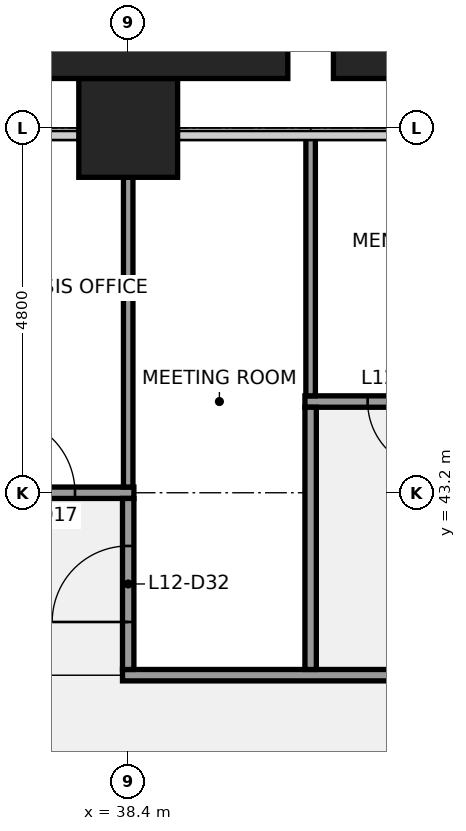
"""IFC4 building model, lengths in metres.
Left out: names, types, materials, properties, quantities, classifications, styles, units other than length and angle.
Written with IfcOpenShell. Run it as: python <this file> out.ifc"""

import sys

from ifc_helpers import new_model, si_unit, direction, frame, frame_2d, origin, origin_2d, place, context, subcontext, project, spatial, rectangle, extrude, element, fill, save


model = new_model("IFC4")
c1 = context("Model", 3, precision=1e-05, world=origin(), true_north=direction((0.0, 1.0)))
c2 = subcontext(c1, "Body", "Model", "MODEL_VIEW")
j1 = project(units=[si_unit("LENGTHUNIT", "METRE"), si_unit("PLANEANGLEUNIT", "RADIAN")], contexts=[c1])
p1 = place(None, origin())
s1 = spatial("IfcSite", under=j1, at=p1, CompositionType="ELEMENT")
p2 = place(p1, origin())
s2 = spatial("IfcBuilding", under=s1, at=p2, CompositionType="ELEMENT")
p3 = place(p2, frame((0.0, 0.0, 59.0)))
s3 = spatial("IfcBuildingStorey", under=s2, at=p3, CompositionType="ELEMENT", Elevation=59.0)
p4 = place(p3, frame((38.4, 48.0, 0.0), z_axis=(0.0, 0.0, 1.0), x_axis=(1.0, 0.0, 0.0)))
e1 = element("IfcColumn", 1, at=p4, inside=s3, PredefinedType="COLUMN", context=c2, shape_type="SweptSolid", body=[
    extrude(rectangle(XDim=1.3, YDim=1.3, at=origin_2d()), origin(), (0.0, 0.0, 1.0), 4.0),
])
p5 = place(p3, frame((38.325, 40.8, 0.0), z_axis=(0.0, 0.0, 1.0), x_axis=(1.0, 0.0, 0.0)))
e2 = element("IfcWall", 2, at=p5, inside=s3, PredefinedType="PARTITIONING", context=c2, shape_type="SweptSolid", body=[
    extrude(rectangle(XDim=9.75, YDim=0.15, at=frame_2d((4.875, 0.0))), origin(), (0.0, 0.0, 1.0), 2.87),
])
p6 = place(p5, frame((5.575, 0.0, 0.0)))
e3 = element("IfcOpeningElement", 3, at=p6, cuts=e2, PredefinedType="OPENING", context=c2, shape_type="SweptSolid", body=[
    extrude(rectangle(XDim=1.0, YDim=2.1, at=frame_2d((0.5, 1.05))), frame((0.0, 0.085, 0.0), z_axis=(0.0, -1.0, 0.0), x_axis=(1.0, 0.0, 0.0)), (0.0, 0.0, 1.0), 0.17),
])
p7 = place(p3, frame((19.125, 43.2, 0.0), z_axis=(0.0, 0.0, 1.0), x_axis=(1.0, 0.0, 0.0)))
e4 = element("IfcWall", 4, at=p7, inside=s3, PredefinedType="PARTITIONING", context=c2, shape_type="SweptSolid", body=[
    extrude(rectangle(XDim=19.35, YDim=0.15, at=frame_2d((9.675, 0.0))), origin(), (0.0, 0.0, 1.0), 2.87),
])
p8 = place(p7, frame((4.375, 0.0, 0.0)))
e5 = element("IfcOpeningElement", 5, at=p8, cuts=e4, PredefinedType="OPENING", context=c2, shape_type="SweptSolid", body=[
    extrude(rectangle(XDim=1.0, YDim=2.1, at=frame_2d((0.5, 1.05))), frame((0.0, 0.085, 0.0), z_axis=(0.0, -1.0, 0.0), x_axis=(1.0, 0.0, 0.0)), (0.0, 0.0, 1.0), 0.17),
])
p9 = place(p7, frame((10.375, 0.0, 0.0)))
e6 = element("IfcOpeningElement", 6, at=p9, cuts=e4, PredefinedType="OPENING", context=c2, shape_type="SweptSolid", body=[
    extrude(rectangle(XDim=1.0, YDim=2.1, at=frame_2d((0.5, 1.05))), frame((0.0, 0.085, 0.0), z_axis=(0.0, -1.0, 0.0), x_axis=(1.0, 0.0, 0.0)), (0.0, 0.0, 1.0), 0.17),
])
p10 = place(p7, frame((13.975, 0.0, 0.0)))
e7 = element("IfcOpeningElement", 7, at=p10, cuts=e4, PredefinedType="OPENING", context=c2, shape_type="SweptSolid", body=[
    extrude(rectangle(XDim=1.0, YDim=2.1, at=frame_2d((0.5, 1.05))), frame((0.0, 0.085, 0.0), z_axis=(0.0, -1.0, 0.0), x_axis=(1.0, 0.0, 0.0)), (0.0, 0.0, 1.0), 0.17),
])
p11 = place(p7, frame((17.575, 0.0, 0.0)))
e8 = element("IfcOpeningElement", 8, at=p11, cuts=e4, PredefinedType="OPENING", context=c2, shape_type="SweptSolid", body=[
    extrude(rectangle(XDim=1.0, YDim=2.1, at=frame_2d((0.5, 1.05))), frame((0.0, 0.085, 0.0), z_axis=(0.0, -1.0, 0.0), x_axis=(1.0, 0.0, 0.0)), (0.0, 0.0, 1.0), 0.17),
])
p12 = place(p3, frame((40.725, 44.4, 0.0), z_axis=(0.0, 0.0, 1.0), x_axis=(1.0, 0.0, 0.0)))
e9 = element("IfcWall", 9, at=p12, inside=s3, PredefinedType="PARTITIONING", context=c2, shape_type="SweptSolid", body=[
    extrude(rectangle(XDim=7.175, YDim=0.15, at=frame_2d((3.587, 0.0))), origin(), (0.0, 0.0, 1.0), 2.87),
])
p13 = place(p12, frame((0.825, 0.0, 0.0)))
e10 = element("IfcOpeningElement", 10, at=p13, cuts=e9, PredefinedType="OPENING", context=c2, shape_type="SweptSolid", body=[
    extrude(rectangle(XDim=0.9, YDim=2.1, at=frame_2d((0.45, 1.05))), frame((0.0, 0.085, 0.0), z_axis=(0.0, -1.0, 0.0), x_axis=(1.0, 0.0, 0.0)), (0.0, 0.0, 1.0), 0.17),
])
p14 = place(p12, frame((3.225, 0.0, 0.0)))
e11 = element("IfcOpeningElement", 11, at=p14, cuts=e9, PredefinedType="OPENING", context=c2, shape_type="SweptSolid", body=[
    extrude(rectangle(XDim=0.9, YDim=2.1, at=frame_2d((0.45, 1.05))), frame((0.0, 0.085, 0.0), z_axis=(0.0, -1.0, 0.0), x_axis=(1.0, 0.0, 0.0)), (0.0, 0.0, 1.0), 0.17),
])
p15 = place(p12, frame((5.425, 0.0, 0.0)))
e12 = element("IfcOpeningElement", 12, at=p15, cuts=e9, PredefinedType="OPENING", context=c2, shape_type="SweptSolid", body=[
    extrude(rectangle(XDim=1.2, YDim=2.1, at=frame_2d((0.6, 1.05))), frame((0.0, 0.085, 0.0), z_axis=(0.0, -1.0, 0.0), x_axis=(1.0, 0.0, 0.0)), (0.0, 0.0, 1.0), 0.17),
])
p16 = place(p3, frame((38.4, 43.275, 0.0), z_axis=(0.0, 0.0, 1.0), x_axis=(0.0, 1.0, 0.0)))
e13 = element("IfcWall", 13, at=p16, inside=s3, PredefinedType="PARTITIONING", context=c2, shape_type="SweptSolid", body=[
    extrude(rectangle(XDim=4.075, YDim=0.125, at=frame_2d((2.038, 0.0))), origin(), (0.0, 0.0, 1.0), 2.87),
])
p17 = place(p3, frame((38.4, 40.875, 0.0), z_axis=(0.0, 0.0, 1.0), x_axis=(0.0, 1.0, 0.0)))
e14 = element("IfcWall", 14, at=p17, inside=s3, PredefinedType="PARTITIONING", context=c2, shape_type="SweptSolid", body=[
    extrude(rectangle(XDim=2.25, YDim=0.15, at=frame_2d((1.125, 0.0))), origin(), (0.0, 0.0, 1.0), 2.87),
])
p18 = place(p17, frame((0.625, 0.0, 0.0)))
e15 = element("IfcOpeningElement", 15, at=p18, cuts=e14, PredefinedType="OPENING", context=c2, shape_type="SweptSolid", body=[
    extrude(rectangle(XDim=1.0, YDim=2.1, at=frame_2d((0.5, 1.05))), frame((0.0, 0.085, 0.0), z_axis=(0.0, -1.0, 0.0), x_axis=(1.0, 0.0, 0.0)), (0.0, 0.0, 1.0), 0.17),
])
p19 = place(p3, frame((40.8, 44.475, 0.0), z_axis=(0.0, 0.0, 1.0), x_axis=(0.0, 1.0, 0.0)))
e16 = element("IfcWall", 16, at=p19, inside=s3, PredefinedType="PARTITIONING", context=c2, shape_type="SweptSolid", body=[
    extrude(rectangle(XDim=3.425, YDim=0.125, at=frame_2d((1.712, 0.0))), origin(), (0.0, 0.0, 1.0), 2.87),
])
p20 = place(p3, frame((40.8, 40.875, 0.0), z_axis=(0.0, 0.0, 1.0), x_axis=(0.0, 1.0, 0.0)))
e17 = element("IfcWall", 17, at=p20, inside=s3, PredefinedType="PARTITIONING", context=c2, shape_type="SweptSolid", body=[
    extrude(rectangle(XDim=3.45, YDim=0.15, at=frame_2d((1.725, 0.0))), origin(), (0.0, 0.0, 1.0), 2.87),
])
for number, where, z_axis, x_axis in (
    (18, (38.4, 49.075, 0.0), (0.0, 0.0, 1.0), (1.0, 0.0, 0.0)),
    (19, (43.2, 49.075, 0.0), (0.0, 0.0, 1.0), (1.0, 0.0, 0.0)),
):
    element("IfcColumn", number, at=place(p3, frame(where, z_axis=z_axis, x_axis=x_axis)), inside=s3, PredefinedType="PILASTER", context=c2, shape_type="SweptSolid", body=[
        extrude(rectangle(XDim=4.2, YDim=0.85, at=origin_2d()), origin(), (0.0, 0.0, 1.0), 4.0),
    ])
p21 = place(p11, origin())
e20 = element("IfcDoor", 20, at=p21, inside=s3, OperationType="SINGLE_SWING_LEFT", PredefinedType="DOOR", context=c2, shape_type="SweptSolid", body=[
    extrude(rectangle(XDim=1.0, YDim=2.1, at=frame_2d((0.5, 1.05))), frame((0.0, 0.025, 0.0), z_axis=(0.0, -1.0, 0.0), x_axis=(1.0, 0.0, 0.0)), (0.0, 0.0, 1.0), 0.05),
])
fill(e8, e20)
p22 = place(p13, origin())
e21 = element("IfcDoor", 21, at=p22, inside=s3, OperationType="SINGLE_SWING_RIGHT", PredefinedType="DOOR", context=c2, shape_type="SweptSolid", body=[
    extrude(rectangle(XDim=0.9, YDim=2.1, at=frame_2d((0.45, 1.05))), frame((0.0, 0.025, 0.0), z_axis=(0.0, -1.0, 0.0), x_axis=(1.0, 0.0, 0.0)), (0.0, 0.0, 1.0), 0.05),
])
fill(e10, e21)
p23 = place(p18, origin())
e22 = element("IfcDoor", 22, at=p23, inside=s3, OperationType="SINGLE_SWING_LEFT", PredefinedType="DOOR", context=c2, shape_type="SweptSolid", body=[
    extrude(rectangle(XDim=1.0, YDim=2.1, at=frame_2d((0.5, 1.05))), frame((0.0, 0.025, 0.0), z_axis=(0.0, -1.0, 0.0), x_axis=(1.0, 0.0, 0.0)), (0.0, 0.0, 1.0), 0.05),
])
fill(e15, e22)
save(model, sys.argv[1])
